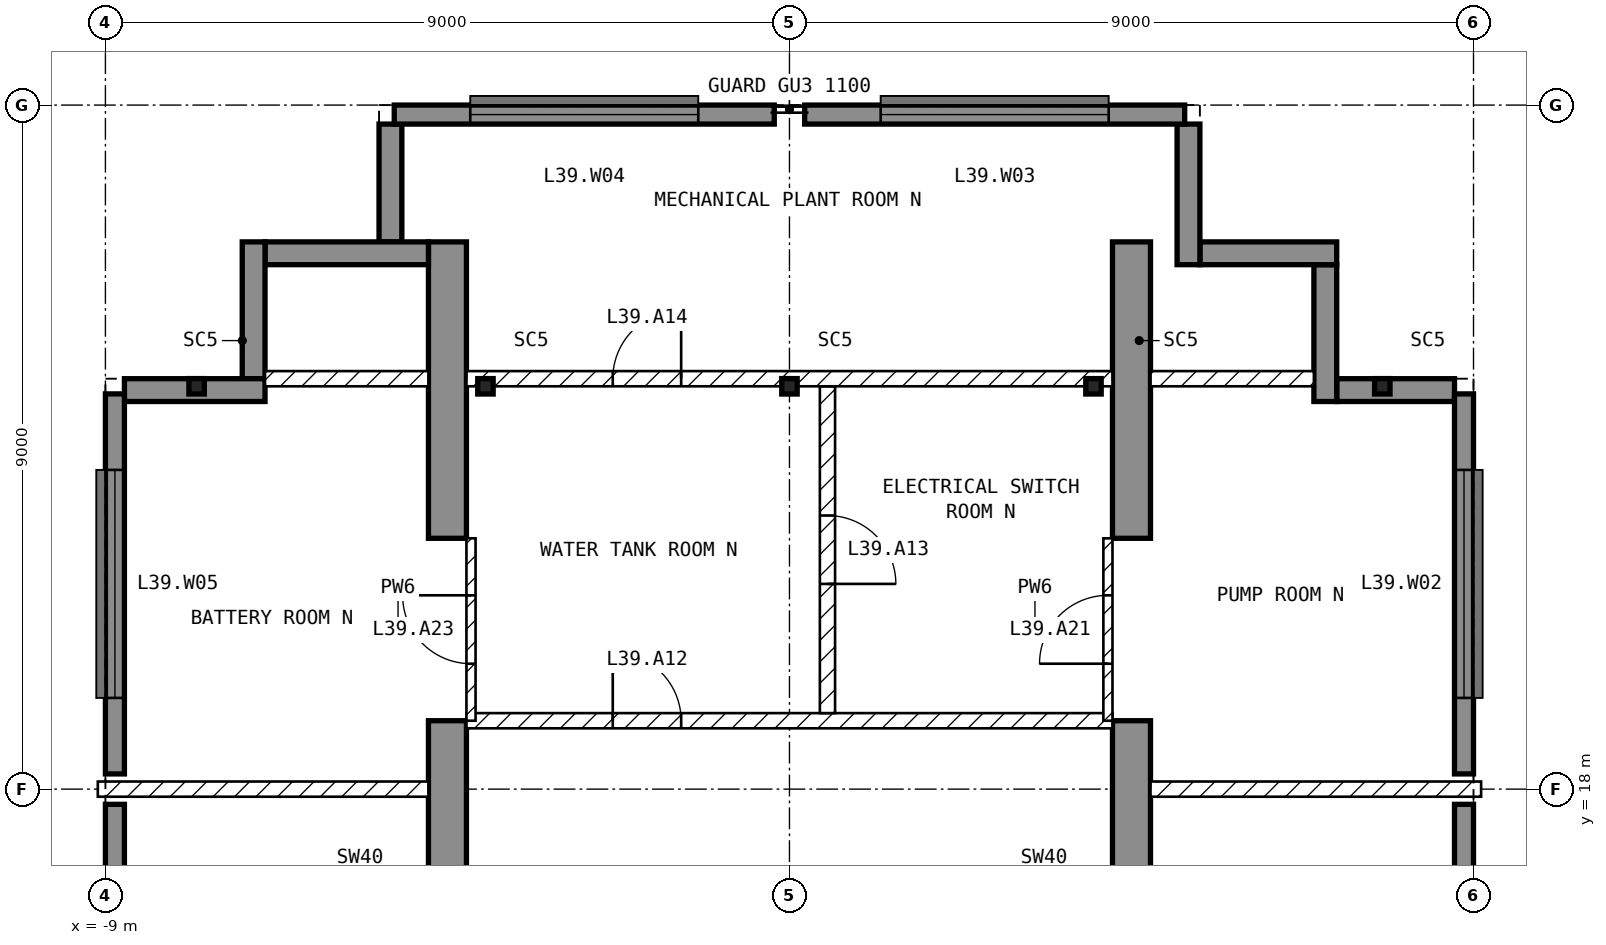
"""IFC4 building model, lengths in metres.
Left out: names, types, materials, properties, quantities, classifications, styles, units other than length and angle.
Written with IfcOpenShell. Run it as: python <this file> out.ifc"""

import sys

from ifc_helpers import new_model, si_unit, direction, frame, frame_2d, origin, origin_2d, place, context, subcontext, project, spatial, polyline, rectangle, hollow_rectangle, outline, extrude, element, fill, save


model = new_model("IFC4")
c1 = context("Model", 3, precision=1e-05, world=origin(), true_north=direction((0.0, 1.0)))
c2 = subcontext(c1, "Body", "Model", "MODEL_VIEW")
j1 = project(units=[si_unit("LENGTHUNIT", "METRE"), si_unit("PLANEANGLEUNIT", "RADIAN")], contexts=[c1])
p1 = place(None, origin())
s1 = spatial("IfcSite", under=j1, at=p1, CompositionType="ELEMENT")
p2 = place(p1, origin())
s2 = spatial("IfcBuilding", under=s1, at=p2, CompositionType="ELEMENT")
p3 = place(p2, frame((0.0, 0.0, 162.1)))
s3 = spatial("IfcBuildingStorey", under=s2, at=p3, CompositionType="ELEMENT", Elevation=162.1)
for number, where, z_axis, x_axis in (
    (1, (-4.75, 9.0, -0.45), (1.0, 0.0, 0.0), (0.0, 1.0, 0.0)),
    (2, (4.25, 9.0, -0.45), (1.0, 0.0, 0.0), (0.0, 1.0, 0.0)),
):
    element("IfcWall", number, at=place(p3, frame(where, z_axis=z_axis, x_axis=x_axis)), inside=s3, PredefinedType="SHEAR", context=c2, shape_type="SweptSolid", body=[
        extrude(outline(polyline([(0.0, 0.0), (2.1, 0.0), (2.1, 2.85), (4.5, 2.85), (4.5, 0.0), (9.9, 0.0), (9.9, 2.85), (12.3, 2.85), (12.3, 0.0), (16.2, 0.0), (16.2, 4.7), (0.0, 4.7), (0.0, 0.0)])), origin(), (0.0, 0.0, 1.0), 0.5),
    ])
p4 = place(p3, frame((8.875, 9.2, 0.0), z_axis=(0.0, 0.0, 1.0), x_axis=(0.0, 1.0, 0.0)))
e3 = element("IfcWall", 3, at=p4, inside=s3, PredefinedType="SOLIDWALL", context=c2, shape_type="SweptSolid", body=[
    extrude(rectangle(XDim=8.6, YDim=0.25, at=frame_2d((4.3, 0.0))), origin(), (0.0, 0.0, 1.0), 4.25),
])
p5 = place(p4, frame((2.8, 0.0, 1.0)))
e4 = element("IfcOpeningElement", 4, at=p5, cuts=e3, PredefinedType="OPENING", context=c2, shape_type="SweptSolid", body=[
    extrude(rectangle(XDim=3.0, YDim=2.4, at=frame_2d((1.5, 1.2))), frame((0.0, 0.135, 0.0), z_axis=(0.0, -1.0, 0.0), x_axis=(1.0, 0.0, 0.0)), (0.0, 0.0, 1.0), 0.27),
])
p6 = place(p3, frame((8.875, 18.2, 0.0), z_axis=(0.0, 0.0, 1.0), x_axis=(0.0, 1.0, 0.0)))
e5 = element("IfcWall", 5, at=p6, inside=s3, PredefinedType="SOLIDWALL", context=c2, shape_type="SweptSolid", body=[
    extrude(rectangle(XDim=5.0, YDim=0.25, at=frame_2d((2.5, 0.0))), origin(), (0.0, 0.0, 1.0), 4.25),
])
p7 = place(p6, frame((1.0, 0.0, 1.0)))
e6 = element("IfcOpeningElement", 6, at=p7, cuts=e5, PredefinedType="OPENING", context=c2, shape_type="SweptSolid", body=[
    extrude(rectangle(XDim=3.0, YDim=2.4, at=frame_2d((1.5, 1.2))), frame((0.0, 0.135, 0.0), z_axis=(0.0, -1.0, 0.0), x_axis=(1.0, 0.0, 0.0)), (0.0, 0.0, 1.0), 0.27),
])
p8 = place(p3, frame((5.2, 26.875, 0.0), z_axis=(0.0, 0.0, 1.0), x_axis=(-1.0, 0.0, 0.0)))
e7 = element("IfcWall", 7, at=p8, inside=s3, PredefinedType="SOLIDWALL", context=c2, shape_type="SweptSolid", body=[
    extrude(rectangle(XDim=5.0, YDim=0.25, at=frame_2d((2.5, 0.0))), origin(), (0.0, 0.0, 1.0), 4.25),
])
p9 = place(p8, frame((1.0, 0.0, 1.0)))
e8 = element("IfcOpeningElement", 8, at=p9, cuts=e7, PredefinedType="OPENING", context=c2, shape_type="SweptSolid", body=[
    extrude(rectangle(XDim=3.0, YDim=2.4, at=frame_2d((1.5, 1.2))), frame((0.0, 0.135, 0.0), z_axis=(0.0, -1.0, 0.0), x_axis=(1.0, 0.0, 0.0)), (0.0, 0.0, 1.0), 0.27),
])
p10 = place(p3, frame((-0.2, 26.875, 0.0), z_axis=(0.0, 0.0, 1.0), x_axis=(-1.0, 0.0, 0.0)))
e9 = element("IfcWall", 9, at=p10, inside=s3, PredefinedType="SOLIDWALL", context=c2, shape_type="SweptSolid", body=[
    extrude(rectangle(XDim=5.0, YDim=0.25, at=frame_2d((2.5, 0.0))), origin(), (0.0, 0.0, 1.0), 4.25),
])
p11 = place(p10, frame((1.0, 0.0, 1.0)))
e10 = element("IfcOpeningElement", 10, at=p11, cuts=e9, PredefinedType="OPENING", context=c2, shape_type="SweptSolid", body=[
    extrude(rectangle(XDim=3.0, YDim=2.4, at=frame_2d((1.5, 1.2))), frame((0.0, 0.135, 0.0), z_axis=(0.0, -1.0, 0.0), x_axis=(1.0, 0.0, 0.0)), (0.0, 0.0, 1.0), 0.27),
])
p12 = place(p3, frame((-8.875, 23.2, 0.0), z_axis=(0.0, 0.0, 1.0), x_axis=(0.0, -1.0, 0.0)))
e11 = element("IfcWall", 11, at=p12, inside=s3, PredefinedType="SOLIDWALL", context=c2, shape_type="SweptSolid", body=[
    extrude(rectangle(XDim=5.0, YDim=0.25, at=frame_2d((2.5, 0.0))), origin(), (0.0, 0.0, 1.0), 4.25),
])
p13 = place(p12, frame((1.0, 0.0, 1.0)))
e12 = element("IfcOpeningElement", 12, at=p13, cuts=e11, PredefinedType="OPENING", context=c2, shape_type="SweptSolid", body=[
    extrude(rectangle(XDim=3.0, YDim=2.4, at=frame_2d((1.5, 1.2))), frame((0.0, 0.135, 0.0), z_axis=(0.0, -1.0, 0.0), x_axis=(1.0, 0.0, 0.0)), (0.0, 0.0, 1.0), 0.27),
])
p14 = place(p3, frame((-8.875, 17.8, 0.0), z_axis=(0.0, 0.0, 1.0), x_axis=(0.0, -1.0, 0.0)))
e13 = element("IfcWall", 13, at=p14, inside=s3, PredefinedType="SOLIDWALL", context=c2, shape_type="SweptSolid", body=[
    extrude(rectangle(XDim=8.6, YDim=0.25, at=frame_2d((4.3, 0.0))), origin(), (0.0, 0.0, 1.0), 4.25),
])
p15 = place(p14, frame((2.8, 0.0, 1.0)))
e14 = element("IfcOpeningElement", 14, at=p15, cuts=e13, PredefinedType="OPENING", context=c2, shape_type="SweptSolid", body=[
    extrude(rectangle(XDim=3.0, YDim=2.4, at=frame_2d((1.5, 1.2))), frame((0.0, 0.135, 0.0), z_axis=(0.0, -1.0, 0.0), x_axis=(1.0, 0.0, 0.0)), (0.0, 0.0, 1.0), 0.27),
])
p16 = place(p3, frame((8.75, 23.25, 0.0), z_axis=(0.0, 0.0, 1.0), x_axis=(-1.0, 0.0, 0.0)))
e15 = element("IfcWall", 15, at=p16, inside=s3, PredefinedType="SOLIDWALL", context=c2, shape_type="SweptSolid", body=[
    extrude(rectangle(XDim=1.55, YDim=0.3, at=frame_2d((0.775, 0.0))), origin(), (0.0, 0.0, 1.0), 4.25),
])
p17 = place(p3, frame((7.05, 23.1, 0.0), z_axis=(0.0, 0.0, 1.0), x_axis=(0.0, 1.0, 0.0)))
e16 = element("IfcWall", 16, at=p17, inside=s3, PredefinedType="SOLIDWALL", context=c2, shape_type="SweptSolid", body=[
    extrude(rectangle(XDim=1.8, YDim=0.3, at=frame_2d((0.9, 0.0))), origin(), (0.0, 0.0, 1.0), 4.25),
])
p18 = place(p3, frame((7.2, 25.05, 0.0), z_axis=(0.0, 0.0, 1.0), x_axis=(-1.0, 0.0, 0.0)))
e17 = element("IfcWall", 17, at=p18, inside=s3, PredefinedType="SOLIDWALL", context=c2, shape_type="SweptSolid", body=[
    extrude(rectangle(XDim=1.8, YDim=0.3, at=frame_2d((0.9, 0.0))), origin(), (0.0, 0.0, 1.0), 4.25),
])
p19 = place(p3, frame((5.25, 24.9, 0.0), z_axis=(0.0, 0.0, 1.0), x_axis=(0.0, 1.0, 0.0)))
e18 = element("IfcWall", 18, at=p19, inside=s3, PredefinedType="SOLIDWALL", context=c2, shape_type="SweptSolid", body=[
    extrude(rectangle(XDim=1.85, YDim=0.3, at=frame_2d((0.925, 0.0))), origin(), (0.0, 0.0, 1.0), 4.25),
])
p20 = place(p3, frame((-5.25, 26.75, 0.0), z_axis=(0.0, 0.0, 1.0), x_axis=(0.0, -1.0, 0.0)))
e19 = element("IfcWall", 19, at=p20, inside=s3, PredefinedType="SOLIDWALL", context=c2, shape_type="SweptSolid", body=[
    extrude(rectangle(XDim=1.55, YDim=0.3, at=frame_2d((0.775, 0.0))), origin(), (0.0, 0.0, 1.0), 4.25),
])
p21 = place(p3, frame((-4.75, 25.05, 0.0), z_axis=(0.0, 0.0, 1.0), x_axis=(-1.0, 0.0, 0.0)))
e20 = element("IfcWall", 20, at=p21, inside=s3, PredefinedType="SOLIDWALL", context=c2, shape_type="SweptSolid", body=[
    extrude(rectangle(XDim=2.15, YDim=0.3, at=frame_2d((1.075, 0.0))), origin(), (0.0, 0.0, 1.0), 4.25),
])
p22 = place(p3, frame((-7.05, 25.2, 0.0), z_axis=(0.0, 0.0, 1.0), x_axis=(0.0, -1.0, 0.0)))
e21 = element("IfcWall", 21, at=p22, inside=s3, PredefinedType="SOLIDWALL", context=c2, shape_type="SweptSolid", body=[
    extrude(rectangle(XDim=1.8, YDim=0.3, at=frame_2d((0.9, 0.0))), origin(), (0.0, 0.0, 1.0), 4.25),
])
p23 = place(p3, frame((-6.9, 23.25, 0.0), z_axis=(0.0, 0.0, 1.0), x_axis=(-1.0, 0.0, 0.0)))
e22 = element("IfcWall", 22, at=p23, inside=s3, PredefinedType="SOLIDWALL", context=c2, shape_type="SweptSolid", body=[
    extrude(rectangle(XDim=1.85, YDim=0.3, at=frame_2d((0.925, 0.0))), origin(), (0.0, 0.0, 1.0), 4.25),
])
for number, where, z_axis, x_axis in (
    (23, (-7.8, 23.3, 0.0), (0.0, 0.0, 1.0), (1.0, 0.0, 0.0)),
    (24, (-4.0, 23.3, 0.0), (0.0, 0.0, 1.0), (1.0, 0.0, 0.0)),
    (25, (0.0, 23.3, 0.0), (0.0, 0.0, 1.0), (1.0, 0.0, 0.0)),
    (26, (4.0, 23.3, 0.0), (0.0, 0.0, 1.0), (1.0, 0.0, 0.0)),
    (27, (7.8, 23.3, 0.0), (0.0, 0.0, 1.0), (1.0, 0.0, 0.0)),
):
    element("IfcColumn", number, at=place(p3, frame(where, z_axis=z_axis, x_axis=x_axis)), inside=s3, PredefinedType="COLUMN", context=c2, shape_type="SweptSolid", body=[
        extrude(hollow_rectangle(XDim=0.203, YDim=0.203, WallThickness=0.01, at=origin_2d()), origin(), (0.0, 0.0, 1.0), 4.25),
    ])
p24 = place(p3, frame((-4.25, 18.9, 0.0), z_axis=(0.0, 0.0, 1.0), x_axis=(1.0, 0.0, 0.0)))
e28 = element("IfcWall", 28, at=p24, inside=s3, PredefinedType="PARTITIONING", context=c2, shape_type="SweptSolid", body=[
    extrude(rectangle(XDim=8.5, YDim=0.2, at=frame_2d((4.25, 0.0))), origin(), (0.0, 0.0, 1.0), 4.25),
])
p25 = place(p24, frame((1.925, 0.0, 0.0)))
e29 = element("IfcOpeningElement", 29, at=p25, cuts=e28, PredefinedType="OPENING", context=c2, shape_type="SweptSolid", body=[
    extrude(rectangle(XDim=0.9, YDim=2.1, at=frame_2d((0.45, 1.05))), frame((0.0, 0.11, 0.0), z_axis=(0.0, -1.0, 0.0), x_axis=(1.0, 0.0, 0.0)), (0.0, 0.0, 1.0), 0.22),
])
p26 = place(p3, frame((0.5, 23.3, 0.0), z_axis=(0.0, 0.0, 1.0), x_axis=(0.0, -1.0, 0.0)))
e30 = element("IfcWall", 30, at=p26, inside=s3, PredefinedType="PARTITIONING", context=c2, shape_type="SweptSolid", body=[
    extrude(rectangle(XDim=4.3, YDim=0.2, at=frame_2d((2.15, 0.0))), origin(), (0.0, 0.0, 1.0), 4.25),
])
p27 = place(p26, frame((1.7, 0.0, 0.0)))
e31 = element("IfcOpeningElement", 31, at=p27, cuts=e30, PredefinedType="OPENING", context=c2, shape_type="SweptSolid", body=[
    extrude(rectangle(XDim=0.9, YDim=2.1, at=frame_2d((0.45, 1.05))), frame((0.0, 0.11, 0.0), z_axis=(0.0, -1.0, 0.0), x_axis=(1.0, 0.0, 0.0)), (0.0, 0.0, 1.0), 0.22),
])
p28 = place(p3, frame((-4.25, 23.4, 0.0), z_axis=(0.0, 0.0, 1.0), x_axis=(1.0, 0.0, 0.0)))
e32 = element("IfcWall", 32, at=p28, inside=s3, PredefinedType="PARTITIONING", context=c2, shape_type="SweptSolid", body=[
    extrude(rectangle(XDim=8.5, YDim=0.2, at=frame_2d((4.25, 0.0))), origin(), (0.0, 0.0, 1.0), 4.25),
])
p29 = place(p28, frame((1.925, 0.0, 0.0)))
e33 = element("IfcOpeningElement", 33, at=p29, cuts=e32, PredefinedType="OPENING", context=c2, shape_type="SweptSolid", body=[
    extrude(rectangle(XDim=0.9, YDim=2.1, at=frame_2d((0.45, 1.05))), frame((0.0, 0.11, 0.0), z_axis=(0.0, -1.0, 0.0), x_axis=(1.0, 0.0, 0.0)), (0.0, 0.0, 1.0), 0.22),
])
p30 = place(p3, frame((4.75, 18.0, 0.0), z_axis=(0.0, 0.0, 1.0), x_axis=(1.0, 0.0, 0.0)))
e34 = element("IfcWall", 34, at=p30, inside=s3, PredefinedType="PARTITIONING", context=c2, shape_type="SweptSolid", body=[
    extrude(rectangle(XDim=4.35, YDim=0.2, at=frame_2d((2.175, 0.0))), origin(), (0.0, 0.0, 1.0), 4.25),
])
p31 = place(p3, frame((4.75, 23.4, 0.0), z_axis=(0.0, 0.0, 1.0), x_axis=(1.0, 0.0, 0.0)))
e35 = element("IfcWall", 35, at=p31, inside=s3, PredefinedType="PARTITIONING", context=c2, shape_type="SweptSolid", body=[
    extrude(rectangle(XDim=2.15, YDim=0.2, at=frame_2d((1.075, 0.0))), origin(), (0.0, 0.0, 1.0), 4.25),
])
p32 = place(p3, frame((-9.1, 18.0, 0.0), z_axis=(0.0, 0.0, 1.0), x_axis=(1.0, 0.0, 0.0)))
e36 = element("IfcWall", 36, at=p32, inside=s3, PredefinedType="PARTITIONING", context=c2, shape_type="SweptSolid", body=[
    extrude(rectangle(XDim=4.35, YDim=0.2, at=frame_2d((2.175, 0.0))), origin(), (0.0, 0.0, 1.0), 4.25),
])
p33 = place(p3, frame((-6.9, 23.4, 0.0), z_axis=(0.0, 0.0, 1.0), x_axis=(1.0, 0.0, 0.0)))
e37 = element("IfcWall", 37, at=p33, inside=s3, PredefinedType="PARTITIONING", context=c2, shape_type="SweptSolid", body=[
    extrude(rectangle(XDim=2.15, YDim=0.2, at=frame_2d((1.075, 0.0))), origin(), (0.0, 0.0, 1.0), 4.25),
])
p34 = place(p3, frame((4.19, 18.9, 0.0), z_axis=(0.0, 0.0, 1.0), x_axis=(0.0, 1.0, 0.0)))
e38 = element("IfcWall", 38, at=p34, inside=s3, PredefinedType="PARTITIONING", context=c2, shape_type="SweptSolid", body=[
    extrude(rectangle(XDim=2.4, YDim=0.12, at=frame_2d((1.2, 0.0))), origin(), (0.0, 0.0, 1.0), 2.4),
])
p35 = place(p34, frame((0.75, 0.0, 0.0)))
e39 = element("IfcOpeningElement", 39, at=p35, cuts=e38, PredefinedType="OPENING", context=c2, shape_type="SweptSolid", body=[
    extrude(rectangle(XDim=0.9, YDim=2.1, at=frame_2d((0.45, 1.05))), frame((0.0, 0.07, 0.0), z_axis=(0.0, -1.0, 0.0), x_axis=(1.0, 0.0, 0.0)), (0.0, 0.0, 1.0), 0.14),
])
p36 = place(p3, frame((-4.19, 18.9, 0.0), z_axis=(0.0, 0.0, 1.0), x_axis=(0.0, 1.0, 0.0)))
e40 = element("IfcWall", 40, at=p36, inside=s3, PredefinedType="PARTITIONING", context=c2, shape_type="SweptSolid", body=[
    extrude(rectangle(XDim=2.4, YDim=0.12, at=frame_2d((1.2, 0.0))), origin(), (0.0, 0.0, 1.0), 2.4),
])
p37 = place(p36, frame((0.75, 0.0, 0.0)))
e41 = element("IfcOpeningElement", 41, at=p37, cuts=e40, PredefinedType="OPENING", context=c2, shape_type="SweptSolid", body=[
    extrude(rectangle(XDim=0.9, YDim=2.1, at=frame_2d((0.45, 1.05))), frame((0.0, 0.07, 0.0), z_axis=(0.0, -1.0, 0.0), x_axis=(1.0, 0.0, 0.0)), (0.0, 0.0, 1.0), 0.14),
])
p38 = place(p7, origin())
e42 = element("IfcWindow", 42, at=p38, inside=s3, PartitioningType="SINGLE_PANEL", PredefinedType="WINDOW", context=c2, shape_type="SweptSolid", body=[
    extrude(rectangle(XDim=3.0, YDim=2.4, at=frame_2d((1.5, 1.2))), frame((0.0, 0.03, 0.0), z_axis=(0.0, -1.0, 0.0), x_axis=(1.0, 0.0, 0.0)), (0.0, 0.0, 1.0), 0.06),
])
fill(e6, e42)
p39 = place(p9, origin())
e43 = element("IfcWindow", 43, at=p39, inside=s3, PartitioningType="SINGLE_PANEL", PredefinedType="WINDOW", context=c2, shape_type="SweptSolid", body=[
    extrude(rectangle(XDim=3.0, YDim=2.4, at=frame_2d((1.5, 1.2))), frame((0.0, 0.03, 0.0), z_axis=(0.0, -1.0, 0.0), x_axis=(1.0, 0.0, 0.0)), (0.0, 0.0, 1.0), 0.06),
])
fill(e8, e43)
p40 = place(p11, origin())
e44 = element("IfcWindow", 44, at=p40, inside=s3, PartitioningType="SINGLE_PANEL", PredefinedType="WINDOW", context=c2, shape_type="SweptSolid", body=[
    extrude(rectangle(XDim=3.0, YDim=2.4, at=frame_2d((1.5, 1.2))), frame((0.0, 0.03, 0.0), z_axis=(0.0, -1.0, 0.0), x_axis=(1.0, 0.0, 0.0)), (0.0, 0.0, 1.0), 0.06),
])
fill(e10, e44)
p41 = place(p13, origin())
e45 = element("IfcWindow", 45, at=p41, inside=s3, PartitioningType="SINGLE_PANEL", PredefinedType="WINDOW", context=c2, shape_type="SweptSolid", body=[
    extrude(rectangle(XDim=3.0, YDim=2.4, at=frame_2d((1.5, 1.2))), frame((0.0, 0.03, 0.0), z_axis=(0.0, -1.0, 0.0), x_axis=(1.0, 0.0, 0.0)), (0.0, 0.0, 1.0), 0.06),
])
fill(e12, e45)
p42 = place(p25, origin())
e46 = element("IfcDoor", 46, at=p42, inside=s3, OperationType="SINGLE_SWING_LEFT", PredefinedType="DOOR", context=c2, shape_type="SweptSolid", body=[
    extrude(rectangle(XDim=0.9, YDim=2.1, at=frame_2d((0.45, 1.05))), frame((0.0, 0.025, 0.0), z_axis=(0.0, -1.0, 0.0), x_axis=(1.0, 0.0, 0.0)), (0.0, 0.0, 1.0), 0.05),
])
fill(e29, e46)
p43 = place(p27, origin())
e47 = element("IfcDoor", 47, at=p43, inside=s3, OperationType="SINGLE_SWING_RIGHT", PredefinedType="DOOR", context=c2, shape_type="SweptSolid", body=[
    extrude(rectangle(XDim=0.9, YDim=2.1, at=frame_2d((0.45, 1.05))), frame((0.0, 0.025, 0.0), z_axis=(0.0, -1.0, 0.0), x_axis=(1.0, 0.0, 0.0)), (0.0, 0.0, 1.0), 0.05),
])
fill(e31, e47)
p44 = place(p29, origin())
e48 = element("IfcDoor", 48, at=p44, inside=s3, OperationType="SINGLE_SWING_RIGHT", PredefinedType="DOOR", context=c2, shape_type="SweptSolid", body=[
    extrude(rectangle(XDim=0.9, YDim=2.1, at=frame_2d((0.45, 1.05))), frame((0.0, 0.025, 0.0), z_axis=(0.0, -1.0, 0.0), x_axis=(1.0, 0.0, 0.0)), (0.0, 0.0, 1.0), 0.05),
])
fill(e33, e48)
p45 = place(p35, origin())
e49 = element("IfcDoor", 49, at=p45, inside=s3, OperationType="SINGLE_SWING_LEFT", PredefinedType="DOOR", context=c2, shape_type="SweptSolid", body=[
    extrude(rectangle(XDim=0.9, YDim=2.1, at=frame_2d((0.45, 1.05))), frame((0.0, 0.025, 0.0), z_axis=(0.0, -1.0, 0.0), x_axis=(1.0, 0.0, 0.0)), (0.0, 0.0, 1.0), 0.05),
])
fill(e39, e49)
p46 = place(p37, origin())
e50 = element("IfcDoor", 50, at=p46, inside=s3, OperationType="SINGLE_SWING_RIGHT", PredefinedType="DOOR", context=c2, shape_type="SweptSolid", body=[
    extrude(rectangle(XDim=0.9, YDim=2.1, at=frame_2d((0.45, 1.05))), frame((0.0, 0.025, 0.0), z_axis=(0.0, -1.0, 0.0), x_axis=(1.0, 0.0, 0.0)), (0.0, 0.0, 1.0), 0.05),
])
fill(e41, e50)
save(model, sys.argv[1])
